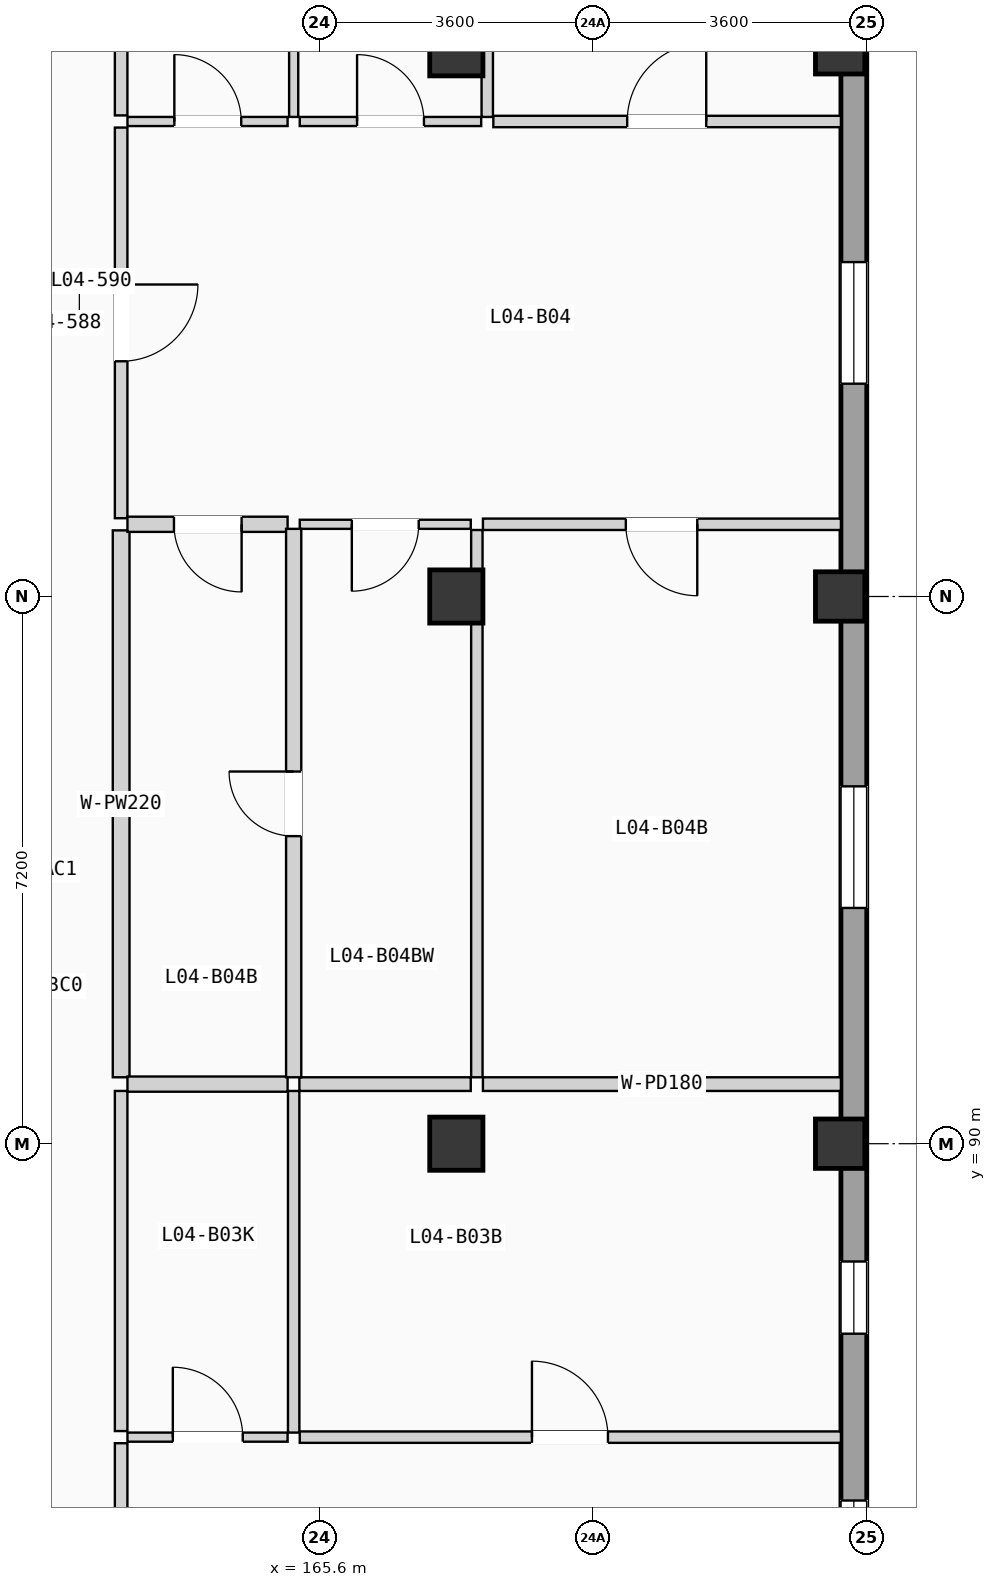
"""IFC4 building model, lengths in metres.
Left out: names, types, materials, properties, quantities, classifications, styles, units other than length and angle.
Written with IfcOpenShell. Run it as: python <this file> out.ifc"""

import sys

from ifc_helpers import new_model, si_unit, direction, frame, frame_2d, origin, origin_2d, place, context, subcontext, project, spatial, rectangle, extrude, element, fill, save


model = new_model("IFC4")
c1 = context("Model", 3, precision=1e-05, world=origin(), true_north=direction((0.0, 1.0)))
c2 = subcontext(c1, "Body", "Model", "MODEL_VIEW")
j1 = project(units=[si_unit("LENGTHUNIT", "METRE"), si_unit("PLANEANGLEUNIT", "RADIAN")], contexts=[c1])
p1 = place(None, origin())
s1 = spatial("IfcSite", under=j1, at=p1, CompositionType="ELEMENT")
p2 = place(p1, origin())
s2 = spatial("IfcBuilding", under=s1, at=p2, CompositionType="ELEMENT")
p3 = place(p2, frame((0.0, 0.0, 15.225)))
s3 = spatial("IfcBuildingStorey", under=s2, at=p3, CompositionType="ELEMENT", Elevation=15.225)
for number, where, z_axis, x_axis in (
    (1, (167.4, 90.0, 0.0), (0.0, 0.0, 1.0), (1.0, 0.0, 0.0)),
    (2, (167.4, 97.2, 0.0), (0.0, 0.0, 1.0), (1.0, 0.0, 0.0)),
    (3, (167.4, 104.4, 0.0), (0.0, 0.0, 1.0), (1.0, 0.0, 0.0)),
):
    element("IfcColumn", number, at=place(p3, frame(where, z_axis=z_axis, x_axis=x_axis)), inside=s3, PredefinedType="COLUMN", context=c2, shape_type="SweptSolid", body=[
        extrude(rectangle(XDim=0.7, YDim=0.7, at=origin_2d()), origin(), (0.0, 0.0, 1.0), 3.15),
    ])
for number, where, z_axis, x_axis in (
    (4, (172.45, 90.0, 0.0), (0.0, 0.0, 1.0), (1.0, 0.0, 0.0)),
    (5, (172.45, 97.2, 0.0), (0.0, 0.0, 1.0), (1.0, 0.0, 0.0)),
    (6, (172.45, 104.4, 0.0), (0.0, 0.0, 1.0), (1.0, 0.0, 0.0)),
):
    element("IfcColumn", number, at=place(p3, frame(where, z_axis=z_axis, x_axis=x_axis)), inside=s3, PredefinedType="COLUMN", context=c2, shape_type="SweptSolid", body=[
        extrude(rectangle(XDim=0.65, YDim=0.65, at=origin_2d()), origin(), (0.0, 0.0, 1.0), 3.15),
    ])
p4 = place(p3, frame((172.63, 68.74, 0.0), z_axis=(0.0, 0.0, 1.0), x_axis=(0.0, 1.0, 0.0)))
e7 = element("IfcWall", 7, at=p4, inside=s3, PredefinedType="SOLIDWALL", context=c2, shape_type="SweptSolid", body=[
    extrude(rectangle(XDim=49.72, YDim=0.34, at=frame_2d((24.86, 0.0))), origin(), (0.0, 0.0, 1.0), 2.89),
])
p5 = place(p4, frame((15.085, 0.0, 0.705)))
e8 = element("IfcOpeningElement", 8, at=p5, cuts=e7, PredefinedType="OPENING", context=c2, shape_type="SweptSolid", body=[
    extrude(rectangle(XDim=1.48, YDim=1.5, at=frame_2d((0.74, 0.75))), frame((0.0, 0.18, 0.0), z_axis=(0.0, -1.0, 0.0), x_axis=(1.0, 0.0, 0.0)), (0.0, 0.0, 1.0), 0.36),
])
p6 = place(p4, frame((8.758, 0.0, 0.555)))
e9 = element("IfcOpeningElement", 9, at=p6, cuts=e7, PredefinedType="OPENING", context=c2, shape_type="SweptSolid", body=[
    extrude(rectangle(XDim=1.48, YDim=1.65, at=frame_2d((0.74, 0.825))), frame((0.0, 0.18, 0.0), z_axis=(0.0, -1.0, 0.0), x_axis=(1.0, 0.0, 0.0)), (0.0, 0.0, 1.0), 0.36),
])
p7 = place(p4, frame((18.76, 0.0, 0.85)))
e10 = element("IfcOpeningElement", 10, at=p7, cuts=e7, PredefinedType="OPENING", context=c2, shape_type="SweptSolid", body=[
    extrude(rectangle(XDim=0.95, YDim=1.2, at=frame_2d((0.475, 0.6))), frame((0.0, 0.18, 0.0), z_axis=(0.0, -1.0, 0.0), x_axis=(1.0, 0.0, 0.0)), (0.0, 0.0, 1.0), 0.36),
])
p8 = place(p4, frame((31.26, 0.0, 0.9)))
e11 = element("IfcOpeningElement", 11, at=p8, cuts=e7, PredefinedType="OPENING", context=c2, shape_type="SweptSolid", body=[
    extrude(rectangle(XDim=1.6, YDim=1.2, at=frame_2d((0.8, 0.6))), frame((0.0, 0.18, 0.0), z_axis=(0.0, -1.0, 0.0), x_axis=(1.0, 0.0, 0.0)), (0.0, 0.0, 1.0), 0.36),
])
p9 = place(p4, frame((24.362, 0.0, 0.855)))
e12 = element("IfcOpeningElement", 12, at=p9, cuts=e7, PredefinedType="OPENING", context=c2, shape_type="SweptSolid", body=[
    extrude(rectangle(XDim=1.6, YDim=1.35, at=frame_2d((0.8, 0.675))), frame((0.0, 0.18, 0.0), z_axis=(0.0, -1.0, 0.0), x_axis=(1.0, 0.0, 0.0)), (0.0, 0.0, 1.0), 0.36),
])
p10 = place(p4, frame((38.395, 0.0, 0.705)))
e13 = element("IfcOpeningElement", 13, at=p10, cuts=e7, PredefinedType="OPENING", context=c2, shape_type="SweptSolid", body=[
    extrude(rectangle(XDim=1.6, YDim=1.5, at=frame_2d((0.8, 0.75))), frame((0.0, 0.18, 0.0), z_axis=(0.0, -1.0, 0.0), x_axis=(1.0, 0.0, 0.0)), (0.0, 0.0, 1.0), 0.36),
])
p11 = place(p3, frame((162.99, 80.635, 0.0), z_axis=(0.0, 0.0, 1.0), x_axis=(0.0, 1.0, 0.0)))
e14 = element("IfcWall", 14, at=p11, inside=s3, PredefinedType="PARTITIONING", context=c2, shape_type="SweptSolid", body=[
    extrude(rectangle(XDim=5.424, YDim=0.165, at=frame_2d((2.712, 0.0))), origin(), (0.0, 0.0, 1.0), 2.87),
])
p12 = place(p11, frame((2.207, 0.0, 0.0)))
e15 = element("IfcOpeningElement", 15, at=p12, cuts=e14, PredefinedType="OPENING", context=c2, shape_type="SweptSolid", body=[
    extrude(rectangle(XDim=1.01, YDim=2.11, at=frame_2d((0.505, 1.055))), frame((0.0, 0.093, 0.0), z_axis=(0.0, -1.0, 0.0), x_axis=(1.0, 0.0, 0.0)), (0.0, 0.0, 1.0), 0.185),
])
p13 = place(p3, frame((162.99, 86.219, 0.0), z_axis=(0.0, 0.0, 1.0), x_axis=(0.0, 1.0, 0.0)))
e16 = element("IfcWall", 16, at=p13, inside=s3, PredefinedType="PARTITIONING", context=c2, shape_type="SweptSolid", body=[
    extrude(rectangle(XDim=4.475, YDim=0.165, at=frame_2d((2.238, 0.0))), origin(), (0.0, 0.0, 1.0), 2.87),
])
p14 = place(p3, frame((162.99, 98.23, 0.0), z_axis=(0.0, 0.0, 1.0), x_axis=(0.0, 1.0, 0.0)))
e17 = element("IfcWall", 17, at=p14, inside=s3, PredefinedType="PARTITIONING", context=c2, shape_type="SweptSolid", body=[
    extrude(rectangle(XDim=5.14, YDim=0.165, at=frame_2d((2.57, 0.0))), origin(), (0.0, 0.0, 1.0), 2.87),
])
p15 = place(p14, frame((2.065, 0.0, 0.0)))
e18 = element("IfcOpeningElement", 18, at=p15, cuts=e17, PredefinedType="OPENING", context=c2, shape_type="SweptSolid", body=[
    extrude(rectangle(XDim=1.01, YDim=2.11, at=frame_2d((0.505, 1.055))), frame((0.0, 0.093, 0.0), z_axis=(0.0, -1.0, 0.0), x_axis=(1.0, 0.0, 0.0)), (0.0, 0.0, 1.0), 0.185),
])
p16 = place(p3, frame((162.99, 90.874, 0.0), z_axis=(0.0, 0.0, 1.0), x_axis=(0.0, 1.0, 0.0)))
e19 = element("IfcWall", 19, at=p16, inside=s3, PredefinedType="PLUMBINGWALL", context=c2, shape_type="SweptSolid", body=[
    extrude(rectangle(XDim=7.196, YDim=0.22, at=frame_2d((3.598, 0.0))), origin(), (0.0, 0.0, 1.0), 2.87),
])
p17 = place(p3, frame((162.99, 103.53, 0.0), z_axis=(0.0, 0.0, 1.0), x_axis=(0.0, 1.0, 0.0)))
e20 = element("IfcWall", 20, at=p17, inside=s3, PredefinedType="PARTITIONING", context=c2, shape_type="SweptSolid", body=[
    extrude(rectangle(XDim=7.67, YDim=0.165, at=frame_2d((3.835, 0.0))), origin(), (0.0, 0.0, 1.0), 2.87),
])
p18 = place(p3, frame((163.073, 86.139, 0.0), z_axis=(0.0, 0.0, 1.0), x_axis=(1.0, 0.0, 0.0)))
e21 = element("IfcWall", 21, at=p18, inside=s3, PredefinedType="PARTITIONING", context=c2, shape_type="SweptSolid", body=[
    extrude(rectangle(XDim=2.107, YDim=0.12, at=frame_2d((1.053, 0.0))), origin(), (0.0, 0.0, 1.0), 2.87),
])
p19 = place(p18, frame((0.597, 0.0, 0.0)))
e22 = element("IfcOpeningElement", 22, at=p19, cuts=e21, PredefinedType="OPENING", context=c2, shape_type="SweptSolid", body=[
    extrude(rectangle(XDim=0.92, YDim=2.02, at=frame_2d((0.46, 1.01))), frame((0.0, 0.07, 0.0), z_axis=(0.0, -1.0, 0.0), x_axis=(1.0, 0.0, 0.0)), (0.0, 0.0, 1.0), 0.14),
])
p20 = place(p3, frame((165.34, 86.139, 0.0), z_axis=(0.0, 0.0, 1.0), x_axis=(1.0, 0.0, 0.0)))
e23 = element("IfcWall", 23, at=p20, inside=s3, PredefinedType="PARTITIONING", context=c2, shape_type="SweptSolid", body=[
    extrude(rectangle(XDim=7.12, YDim=0.15, at=frame_2d((3.56, 0.0))), origin(), (0.0, 0.0, 1.0), 2.87),
])
p21 = place(p20, frame((3.055, 0.0, 0.0)))
e24 = element("IfcOpeningElement", 24, at=p21, cuts=e23, PredefinedType="OPENING", context=c2, shape_type="SweptSolid", body=[
    extrude(rectangle(XDim=1.0, YDim=2.06, at=frame_2d((0.5, 1.03))), frame((0.0, 0.085, 0.0), z_axis=(0.0, -1.0, 0.0), x_axis=(1.0, 0.0, 0.0)), (0.0, 0.0, 1.0), 0.17),
])
p22 = place(p3, frame((165.26, 86.199, 0.0), z_axis=(0.0, 0.0, 1.0), x_axis=(0.0, 1.0, 0.0)))
e25 = element("IfcWall", 25, at=p22, inside=s3, PredefinedType="PARTITIONING", context=c2, shape_type="SweptSolid", body=[
    extrude(rectangle(XDim=4.495, YDim=0.15, at=frame_2d((2.248, 0.0))), origin(), (0.0, 0.0, 1.0), 2.87),
])
p23 = place(p3, frame((163.073, 90.784, 0.0), z_axis=(0.0, 0.0, 1.0), x_axis=(1.0, 0.0, 0.0)))
e26 = element("IfcWall", 26, at=p23, inside=s3, PredefinedType="PLUMBINGWALL", context=c2, shape_type="SweptSolid", body=[
    extrude(rectangle(XDim=2.107, YDim=0.2, at=frame_2d((1.053, 0.0))), origin(), (0.0, 0.0, 1.0), 2.87),
])
p24 = place(p3, frame((167.75, 90.784, 0.0), z_axis=(0.0, 0.0, 1.0), x_axis=(1.0, 0.0, 0.0)))
e27 = element("IfcWall", 27, at=p24, inside=s3, PredefinedType="PARTITIONING", context=c2, shape_type="SweptSolid", body=[
    extrude(rectangle(XDim=4.71, YDim=0.18, at=frame_2d((2.355, 0.0))), origin(), (0.0, 0.0, 1.0), 2.87),
])
p25 = place(p3, frame((165.335, 90.784, 0.0), z_axis=(0.0, 0.0, 1.0), x_axis=(1.0, 0.0, 0.0)))
e28 = element("IfcWall", 28, at=p25, inside=s3, PredefinedType="PARTITIONING", context=c2, shape_type="SweptSolid", body=[
    extrude(rectangle(XDim=2.255, YDim=0.18, at=frame_2d((1.127, 0.0))), origin(), (0.0, 0.0, 1.0), 2.87),
])
p26 = place(p3, frame((163.073, 98.15, 0.0), z_axis=(0.0, 0.0, 1.0), x_axis=(1.0, 0.0, 0.0)))
e29 = element("IfcWall", 29, at=p26, inside=s3, PredefinedType="PLUMBINGWALL", context=c2, shape_type="SweptSolid", body=[
    extrude(rectangle(XDim=2.107, YDim=0.2, at=frame_2d((1.053, 0.0))), origin(), (0.0, 0.0, 1.0), 2.87),
])
p27 = place(p26, frame((0.612, 0.0, 0.0)))
e30 = element("IfcOpeningElement", 30, at=p27, cuts=e29, PredefinedType="OPENING", context=c2, shape_type="SweptSolid", body=[
    extrude(rectangle(XDim=0.89, YDim=2.03, at=frame_2d((0.445, 1.015))), frame((0.0, 0.11, 0.0), z_axis=(0.0, -1.0, 0.0), x_axis=(1.0, 0.0, 0.0)), (0.0, 0.0, 1.0), 0.22),
])
p28 = place(p3, frame((163.073, 103.45, 0.0), z_axis=(0.0, 0.0, 1.0), x_axis=(1.0, 0.0, 0.0)))
e31 = element("IfcWall", 31, at=p28, inside=s3, PredefinedType="PARTITIONING", context=c2, shape_type="SweptSolid", body=[
    extrude(rectangle(XDim=2.107, YDim=0.12, at=frame_2d((1.053, 0.0))), origin(), (0.0, 0.0, 1.0), 2.87),
])
p29 = place(p28, frame((0.617, 0.0, 0.0)))
e32 = element("IfcOpeningElement", 32, at=p29, cuts=e31, PredefinedType="OPENING", context=c2, shape_type="SweptSolid", body=[
    extrude(rectangle(XDim=0.88, YDim=2.02, at=frame_2d((0.44, 1.01))), frame((0.0, 0.07, 0.0), z_axis=(0.0, -1.0, 0.0), x_axis=(1.0, 0.0, 0.0)), (0.0, 0.0, 1.0), 0.14),
])
p30 = place(p3, frame((167.75, 98.15, 0.0), z_axis=(0.0, 0.0, 1.0), x_axis=(1.0, 0.0, 0.0)))
e33 = element("IfcWall", 33, at=p30, inside=s3, PredefinedType="PARTITIONING", context=c2, shape_type="SweptSolid", body=[
    extrude(rectangle(XDim=4.71, YDim=0.15, at=frame_2d((2.355, 0.0))), origin(), (0.0, 0.0, 1.0), 2.87),
])
p31 = place(p30, frame((1.88, 0.0, 0.0)))
e34 = element("IfcOpeningElement", 34, at=p31, cuts=e33, PredefinedType="OPENING", context=c2, shape_type="SweptSolid", body=[
    extrude(rectangle(XDim=0.94, YDim=2.06, at=frame_2d((0.47, 1.03))), frame((0.0, 0.085, 0.0), z_axis=(0.0, -1.0, 0.0), x_axis=(1.0, 0.0, 0.0)), (0.0, 0.0, 1.0), 0.17),
])
p32 = place(p3, frame((165.34, 98.15, 0.0), z_axis=(0.0, 0.0, 1.0), x_axis=(1.0, 0.0, 0.0)))
e35 = element("IfcWall", 35, at=p32, inside=s3, PredefinedType="PARTITIONING", context=c2, shape_type="SweptSolid", body=[
    extrude(rectangle(XDim=2.25, YDim=0.12, at=frame_2d((1.125, 0.0))), origin(), (0.0, 0.0, 1.0), 2.87),
])
p33 = place(p32, frame((0.685, 0.0, 0.0)))
e36 = element("IfcOpeningElement", 36, at=p33, cuts=e35, PredefinedType="OPENING", context=c2, shape_type="SweptSolid", body=[
    extrude(rectangle(XDim=0.88, YDim=2.02, at=frame_2d((0.44, 1.01))), frame((0.0, 0.07, 0.0), z_axis=(0.0, -1.0, 0.0), x_axis=(1.0, 0.0, 0.0)), (0.0, 0.0, 1.0), 0.14),
])
p34 = place(p3, frame((167.887, 103.45, 0.0), z_axis=(0.0, 0.0, 1.0), x_axis=(1.0, 0.0, 0.0)))
e37 = element("IfcWall", 37, at=p34, inside=s3, PredefinedType="PARTITIONING", context=c2, shape_type="SweptSolid", body=[
    extrude(rectangle(XDim=4.573, YDim=0.15, at=frame_2d((2.287, 0.0))), origin(), (0.0, 0.0, 1.0), 2.87),
])
p35 = place(p34, frame((1.761, 0.0, 0.0)))
e38 = element("IfcOpeningElement", 38, at=p35, cuts=e37, PredefinedType="OPENING", context=c2, shape_type="SweptSolid", body=[
    extrude(rectangle(XDim=1.04, YDim=2.08, at=frame_2d((0.52, 1.04))), frame((0.0, 0.085, 0.0), z_axis=(0.0, -1.0, 0.0), x_axis=(1.0, 0.0, 0.0)), (0.0, 0.0, 1.0), 0.17),
])
p36 = place(p3, frame((165.34, 103.45, 0.0), z_axis=(0.0, 0.0, 1.0), x_axis=(1.0, 0.0, 0.0)))
e39 = element("IfcWall", 39, at=p36, inside=s3, PredefinedType="PARTITIONING", context=c2, shape_type="SweptSolid", body=[
    extrude(rectangle(XDim=2.387, YDim=0.12, at=frame_2d((1.193, 0.0))), origin(), (0.0, 0.0, 1.0), 2.87),
])
p37 = place(p36, frame((0.754, 0.0, 0.0)))
e40 = element("IfcOpeningElement", 40, at=p37, cuts=e39, PredefinedType="OPENING", context=c2, shape_type="SweptSolid", body=[
    extrude(rectangle(XDim=0.88, YDim=2.02, at=frame_2d((0.44, 1.01))), frame((0.0, 0.07, 0.0), z_axis=(0.0, -1.0, 0.0), x_axis=(1.0, 0.0, 0.0)), (0.0, 0.0, 1.0), 0.14),
])
p38 = place(p3, frame((165.26, 90.874, 0.0), z_axis=(0.0, 0.0, 1.0), x_axis=(0.0, 1.0, 0.0)))
e41 = element("IfcWall", 41, at=p38, inside=s3, PredefinedType="PLUMBINGWALL", context=c2, shape_type="SweptSolid", body=[
    extrude(rectangle(XDim=7.216, YDim=0.2, at=frame_2d((3.608, 0.0))), origin(), (0.0, 0.0, 1.0), 2.87),
])
p39 = place(p38, frame((3.173, 0.0, 0.0)))
e42 = element("IfcOpeningElement", 42, at=p39, cuts=e41, PredefinedType="OPENING", context=c2, shape_type="SweptSolid", body=[
    extrude(rectangle(XDim=0.85, YDim=2.01, at=frame_2d((0.425, 1.005))), frame((0.0, 0.11, 0.0), z_axis=(0.0, -1.0, 0.0), x_axis=(1.0, 0.0, 0.0)), (0.0, 0.0, 1.0), 0.22),
])
p40 = place(p3, frame((165.26, 103.51, 0.0), z_axis=(0.0, 0.0, 1.0), x_axis=(0.0, 1.0, 0.0)))
e43 = element("IfcWall", 43, at=p40, inside=s3, PredefinedType="PARTITIONING", context=c2, shape_type="SweptSolid", body=[
    extrude(rectangle(XDim=7.69, YDim=0.12, at=frame_2d((3.845, 0.0))), origin(), (0.0, 0.0, 1.0), 2.87),
])
p41 = place(p3, frame((167.67, 90.874, 0.0), z_axis=(0.0, 0.0, 1.0), x_axis=(0.0, 1.0, 0.0)))
e44 = element("IfcWall", 44, at=p41, inside=s3, PredefinedType="PARTITIONING", context=c2, shape_type="SweptSolid", body=[
    extrude(rectangle(XDim=7.201, YDim=0.15, at=frame_2d((3.601, 0.0))), origin(), (0.0, 0.0, 1.0), 2.87),
])
p42 = place(p3, frame((167.807, 103.51, 0.0), z_axis=(0.0, 0.0, 1.0), x_axis=(0.0, 1.0, 0.0)))
e45 = element("IfcWall", 45, at=p42, inside=s3, PredefinedType="PARTITIONING", context=c2, shape_type="SweptSolid", body=[
    extrude(rectangle(XDim=7.69, YDim=0.15, at=frame_2d((3.845, 0.0))), origin(), (0.0, 0.0, 1.0), 2.87),
])
p43 = place(p5, origin())
e46 = element("IfcWindow", 46, at=p43, inside=s3, PartitioningType="SINGLE_PANEL", PredefinedType="WINDOW", context=c2, shape_type="SweptSolid", body=[
    extrude(rectangle(XDim=1.48, YDim=1.5, at=frame_2d((0.74, 0.75))), frame((0.0, 0.03, 0.0), z_axis=(0.0, -1.0, 0.0), x_axis=(1.0, 0.0, 0.0)), (0.0, 0.0, 1.0), 0.06),
])
fill(e8, e46)
p44 = place(p7, origin())
e47 = element("IfcWindow", 47, at=p44, inside=s3, PartitioningType="SINGLE_PANEL", PredefinedType="WINDOW", context=c2, shape_type="SweptSolid", body=[
    extrude(rectangle(XDim=0.95, YDim=1.2, at=frame_2d((0.475, 0.6))), frame((0.0, 0.03, 0.0), z_axis=(0.0, -1.0, 0.0), x_axis=(1.0, 0.0, 0.0)), (0.0, 0.0, 1.0), 0.06),
])
fill(e10, e47)
p45 = place(p8, origin())
e48 = element("IfcWindow", 48, at=p45, inside=s3, PartitioningType="DOUBLE_PANEL_VERTICAL", PredefinedType="WINDOW", context=c2, shape_type="SweptSolid", body=[
    extrude(rectangle(XDim=1.6, YDim=1.2, at=frame_2d((0.8, 0.6))), frame((0.0, 0.03, 0.0), z_axis=(0.0, -1.0, 0.0), x_axis=(1.0, 0.0, 0.0)), (0.0, 0.0, 1.0), 0.06),
])
fill(e11, e48)
p46 = place(p9, origin())
e49 = element("IfcWindow", 49, at=p46, inside=s3, PartitioningType="DOUBLE_PANEL_VERTICAL", PredefinedType="WINDOW", context=c2, shape_type="SweptSolid", body=[
    extrude(rectangle(XDim=1.6, YDim=1.35, at=frame_2d((0.8, 0.675))), frame((0.0, 0.03, 0.0), z_axis=(0.0, -1.0, 0.0), x_axis=(1.0, 0.0, 0.0)), (0.0, 0.0, 1.0), 0.06),
])
fill(e12, e49)
p47 = place(p15, frame((1.01, 0.0, 0.0), z_axis=(0.0, 0.0, 1.0), x_axis=(-1.0, 0.0, 0.0)))
e50 = element("IfcDoor", 50, at=p47, inside=s3, OperationType="SINGLE_SWING_RIGHT", PredefinedType="DOOR", context=c2, shape_type="SweptSolid", body=[
    extrude(rectangle(XDim=1.01, YDim=2.11, at=frame_2d((0.505, 1.055))), frame((0.0, 0.025, 0.0), z_axis=(0.0, -1.0, 0.0), x_axis=(1.0, 0.0, 0.0)), (0.0, 0.0, 1.0), 0.05),
])
fill(e18, e50)
p48 = place(p19, origin())
e51 = element("IfcDoor", 51, at=p48, inside=s3, OperationType="SINGLE_SWING_LEFT", PredefinedType="DOOR", context=c2, shape_type="SweptSolid", body=[
    extrude(rectangle(XDim=0.92, YDim=2.02, at=frame_2d((0.46, 1.01))), frame((0.0, 0.025, 0.0), z_axis=(0.0, -1.0, 0.0), x_axis=(1.0, 0.0, 0.0)), (0.0, 0.0, 1.0), 0.05),
])
fill(e22, e51)
p49 = place(p21, origin())
e52 = element("IfcDoor", 52, at=p49, inside=s3, OperationType="SINGLE_SWING_LEFT", PredefinedType="DOOR", context=c2, shape_type="SweptSolid", body=[
    extrude(rectangle(XDim=1.0, YDim=2.06, at=frame_2d((0.5, 1.03))), frame((0.0, 0.025, 0.0), z_axis=(0.0, -1.0, 0.0), x_axis=(1.0, 0.0, 0.0)), (0.0, 0.0, 1.0), 0.05),
])
fill(e24, e52)
p50 = place(p27, frame((0.89, 0.0, 0.0), z_axis=(0.0, 0.0, 1.0), x_axis=(-1.0, 0.0, 0.0)))
e53 = element("IfcDoor", 53, at=p50, inside=s3, OperationType="SINGLE_SWING_RIGHT", PredefinedType="DOOR", context=c2, shape_type="SweptSolid", body=[
    extrude(rectangle(XDim=0.89, YDim=2.03, at=frame_2d((0.445, 1.015))), frame((0.0, 0.025, 0.0), z_axis=(0.0, -1.0, 0.0), x_axis=(1.0, 0.0, 0.0)), (0.0, 0.0, 1.0), 0.05),
])
fill(e30, e53)
p51 = place(p29, origin())
e54 = element("IfcDoor", 54, at=p51, inside=s3, OperationType="SINGLE_SWING_LEFT", PredefinedType="DOOR", context=c2, shape_type="SweptSolid", body=[
    extrude(rectangle(XDim=0.88, YDim=2.02, at=frame_2d((0.44, 1.01))), frame((0.0, 0.025, 0.0), z_axis=(0.0, -1.0, 0.0), x_axis=(1.0, 0.0, 0.0)), (0.0, 0.0, 1.0), 0.05),
])
fill(e32, e54)
p52 = place(p31, frame((0.94, 0.0, 0.0), z_axis=(0.0, 0.0, 1.0), x_axis=(-1.0, 0.0, 0.0)))
e55 = element("IfcDoor", 55, at=p52, inside=s3, OperationType="SINGLE_SWING_RIGHT", PredefinedType="DOOR", context=c2, shape_type="SweptSolid", body=[
    extrude(rectangle(XDim=0.94, YDim=2.06, at=frame_2d((0.47, 1.03))), frame((0.0, 0.025, 0.0), z_axis=(0.0, -1.0, 0.0), x_axis=(1.0, 0.0, 0.0)), (0.0, 0.0, 1.0), 0.05),
])
fill(e34, e55)
p53 = place(p33, frame((0.88, 0.0, 0.0), z_axis=(0.0, 0.0, 1.0), x_axis=(-1.0, 0.0, 0.0)))
e56 = element("IfcDoor", 56, at=p53, inside=s3, OperationType="SINGLE_SWING_LEFT", PredefinedType="DOOR", context=c2, shape_type="SweptSolid", body=[
    extrude(rectangle(XDim=0.88, YDim=2.02, at=frame_2d((0.44, 1.01))), frame((0.0, 0.025, 0.0), z_axis=(0.0, -1.0, 0.0), x_axis=(1.0, 0.0, 0.0)), (0.0, 0.0, 1.0), 0.05),
])
fill(e36, e56)
p54 = place(p35, origin())
e57 = element("IfcDoor", 57, at=p54, inside=s3, OperationType="SINGLE_SWING_RIGHT", PredefinedType="DOOR", context=c2, shape_type="SweptSolid", body=[
    extrude(rectangle(XDim=1.04, YDim=2.08, at=frame_2d((0.52, 1.04))), frame((0.0, 0.025, 0.0), z_axis=(0.0, -1.0, 0.0), x_axis=(1.0, 0.0, 0.0)), (0.0, 0.0, 1.0), 0.05),
])
fill(e38, e57)
p55 = place(p37, origin())
e58 = element("IfcDoor", 58, at=p55, inside=s3, OperationType="SINGLE_SWING_LEFT", PredefinedType="DOOR", context=c2, shape_type="SweptSolid", body=[
    extrude(rectangle(XDim=0.88, YDim=2.02, at=frame_2d((0.44, 1.01))), frame((0.0, 0.025, 0.0), z_axis=(0.0, -1.0, 0.0), x_axis=(1.0, 0.0, 0.0)), (0.0, 0.0, 1.0), 0.05),
])
fill(e40, e58)
p56 = place(p39, origin())
e59 = element("IfcDoor", 59, at=p56, inside=s3, OperationType="SINGLE_SWING_RIGHT", PredefinedType="DOOR", context=c2, shape_type="SweptSolid", body=[
    extrude(rectangle(XDim=0.85, YDim=2.01, at=frame_2d((0.425, 1.005))), frame((0.0, 0.025, 0.0), z_axis=(0.0, -1.0, 0.0), x_axis=(1.0, 0.0, 0.0)), (0.0, 0.0, 1.0), 0.05),
])
fill(e42, e59)
save(model, sys.argv[1])
